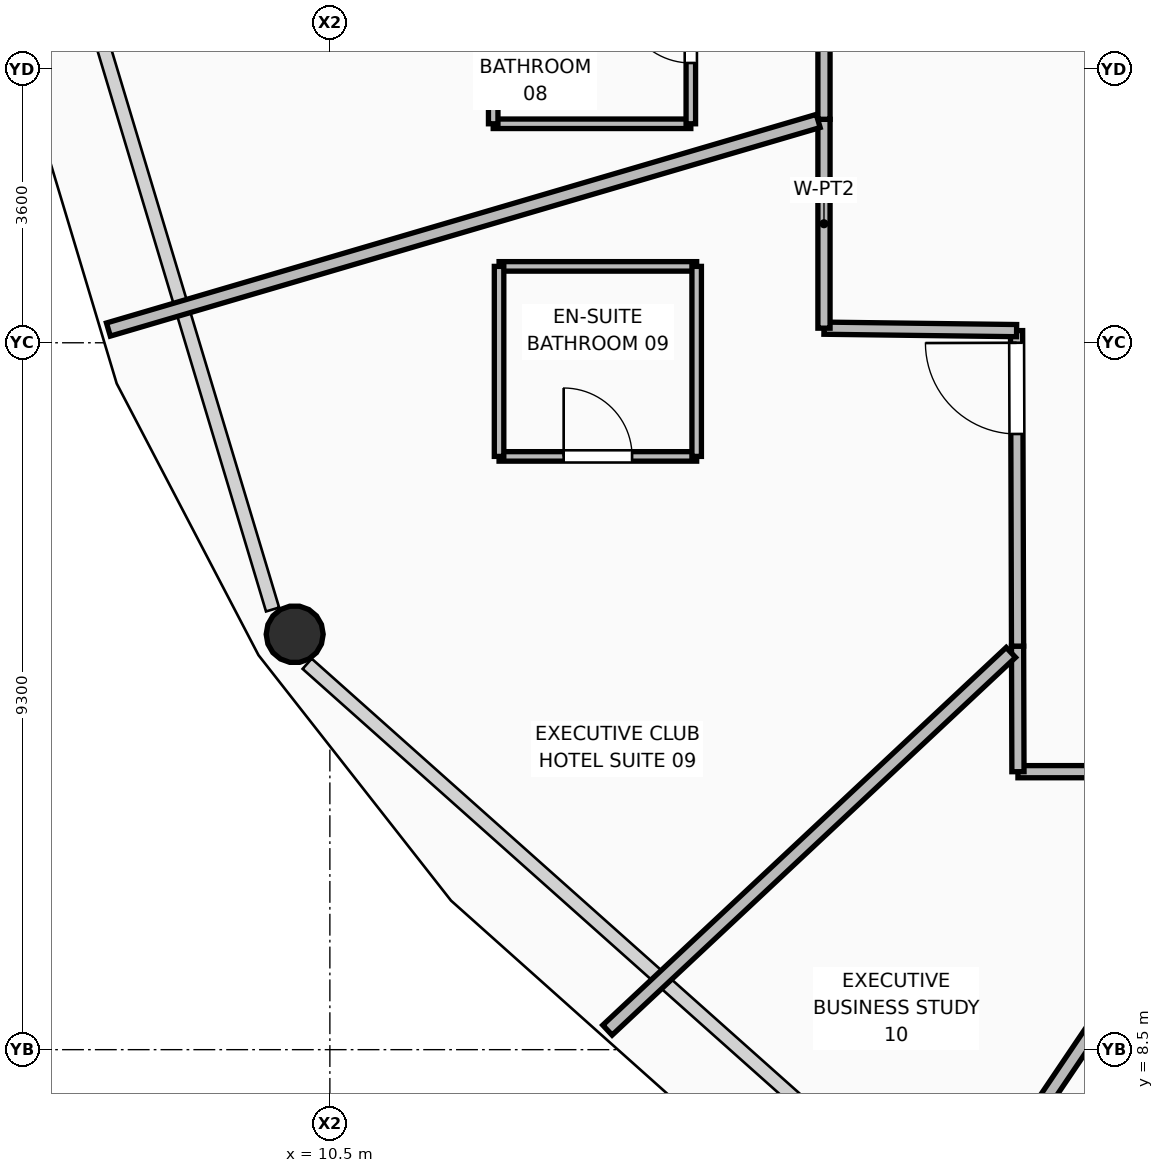
"""IFC4 building model, lengths in metres.
Left out: names, types, materials, properties, quantities, classifications, styles, units other than length and angle.
Written with IfcOpenShell. Run it as: python <this file> out.ifc"""

import sys

from ifc_helpers import new_model, si_unit, direction, frame, frame_2d, origin, origin_2d, place, context, subcontext, project, spatial, rectangle, hollow_circle, extrude, element, fill, save


model = new_model("IFC4")
c1 = context("Model", 3, precision=1e-05, world=origin(), true_north=direction((0.0, 1.0)))
c2 = subcontext(c1, "Body", "Model", "MODEL_VIEW")
j1 = project(units=[si_unit("LENGTHUNIT", "METRE"), si_unit("PLANEANGLEUNIT", "RADIAN")], contexts=[c1])
p1 = place(None, origin())
s1 = spatial("IfcSite", under=j1, at=p1, CompositionType="ELEMENT")
p2 = place(p1, origin())
s2 = spatial("IfcBuilding", under=s1, at=p2, CompositionType="ELEMENT")
p3 = place(p2, frame((0.0, 0.0, 157.2)))
s3 = spatial("IfcBuildingStorey", under=s2, at=p3, CompositionType="ELEMENT", Elevation=157.2)
p4 = place(p3, frame((10.037, 13.965, 0.0), z_axis=(0.0, 0.0, 1.0), x_axis=(1.0, 0.0, 0.0)))
e1 = element("IfcColumn", 1, at=p4, inside=s3, PredefinedType="COLUMN", context=c2, shape_type="SweptSolid", body=[
    extrude(hollow_circle(Radius=0.375, WallThickness=0.035, at=origin_2d()), origin(), (0.0, 0.0, 1.0), 3.57),
])
p5 = place(p3, frame((22.831, 12.158, 0.0), z_axis=(0.0, 0.0, 1.0), x_axis=(-0.999999955626, -0.000297907189, 0.0)))
e2 = element("IfcWall", 2, at=p5, inside=s3, PredefinedType="PARTITIONING", context=c2, shape_type="SweptSolid", body=[
    extrude(rectangle(XDim=3.278, YDim=0.16, at=frame_2d((1.639, 0.0))), origin(), (0.0, 0.0, 1.0), 3.006),
])
p6 = place(p5, frame((0.58, 0.0, 0.0)))
e3 = element("IfcOpeningElement", 3, at=p6, cuts=e2, PredefinedType="OPENING", context=c2, shape_type="SweptSolid", body=[
    extrude(rectangle(XDim=1.0, YDim=2.1, at=frame_2d((0.5, 1.05))), frame((0.0, 0.09, 0.0), z_axis=(0.0, -1.0, 0.0), x_axis=(1.0, 0.0, 0.0)), (0.0, 0.0, 1.0), 0.18),
])
p7 = place(p3, frame((19.553, 12.157, 0.0), z_axis=(0.0, 0.0, 1.0), x_axis=(-0.002955506524, 0.999995632481, 0.0)))
e4 = element("IfcWall", 4, at=p7, inside=s3, PredefinedType="PARTITIONING", context=c2, shape_type="SweptSolid", body=[
    extrude(rectangle(XDim=1.652, YDim=0.16, at=frame_2d((0.826, 0.0))), origin(), (0.0, 0.0, 1.0), 3.55),
])
p8 = place(p3, frame((19.548, 13.809, 0.0), z_axis=(0.0, 0.0, 1.0), x_axis=(-0.00317608091, 0.999994956242, 0.0)))
e5 = element("IfcWall", 5, at=p8, inside=s3, PredefinedType="PARTITIONING", context=c2, shape_type="SweptSolid", body=[
    extrude(rectangle(XDim=4.151, YDim=0.16, at=frame_2d((2.075, 0.0))), origin(), (0.0, 0.0, 1.0), 3.006),
])
p9 = place(p8, frame((2.791, 0.0, 0.0)))
e6 = element("IfcOpeningElement", 6, at=p9, cuts=e5, PredefinedType="OPENING", context=c2, shape_type="SweptSolid", body=[
    extrude(rectangle(XDim=1.2, YDim=2.1, at=frame_2d((0.6, 1.05))), frame((0.0, 0.09, 0.0), z_axis=(0.0, -1.0, 0.0), x_axis=(1.0, 0.0, 0.0)), (0.0, 0.0, 1.0), 0.18),
])
p10 = place(p3, frame((19.535, 17.96, 0.0), z_axis=(0.0, 0.0, 1.0), x_axis=(-0.999920356619, 0.01262063462, 0.0)))
e7 = element("IfcWall", 7, at=p10, inside=s3, PredefinedType="PARTITIONING", context=c2, shape_type="SweptSolid", body=[
    extrude(rectangle(XDim=2.534, YDim=0.16, at=frame_2d((1.267, 0.0))), origin(), (0.0, 0.0, 1.0), 3.55),
])
p11 = place(p3, frame((17.001, 17.992, 0.0), z_axis=(0.0, 0.0, 1.0), x_axis=(0.0, 1.0, 0.0)))
e8 = element("IfcWall", 8, at=p11, inside=s3, PredefinedType="PARTITIONING", context=c2, shape_type="SweptSolid", body=[
    extrude(rectangle(XDim=2.748, YDim=0.16, at=frame_2d((1.374, 0.0))), origin(), (0.0, 0.0, 1.0), 3.55),
])
p12 = place(p3, frame((17.001, 20.74, 0.0), z_axis=(0.0, 0.0, 1.0), x_axis=(0.0, 1.0, 0.0)))
e9 = element("IfcWall", 9, at=p12, inside=s3, PredefinedType="PARTITIONING", context=c2, shape_type="SweptSolid", body=[
    extrude(rectangle(XDim=3.118, YDim=0.16, at=frame_2d((1.559, 0.0))), origin(), (0.0, 0.0, 1.0), 3.006),
])
p13 = place(p3, frame((16.925, 20.718, 0.0), z_axis=(0.0, 0.0, 1.0), x_axis=(-0.959446138816, -0.2818920125, 0.0)))
e10 = element("IfcWall", 10, at=p13, inside=s3, PredefinedType="PARTITIONING", context=c2, shape_type="SweptSolid", body=[
    extrude(rectangle(XDim=9.734, YDim=0.18, at=frame_2d((4.867, 0.0))), origin(), (0.0, 0.0, 1.0), 2.852),
])
p14 = place(p3, frame((19.46, 13.726, 0.0), z_axis=(0.0, 0.0, 1.0), x_axis=(-0.730026032341, -0.683419338404, 0.0)))
e11 = element("IfcWall", 11, at=p14, inside=s3, PredefinedType="PARTITIONING", context=c2, shape_type="SweptSolid", body=[
    extrude(rectangle(XDim=7.271, YDim=0.18, at=frame_2d((3.635, 0.0))), origin(), (0.0, 0.0, 1.0), 2.852),
])
p15 = place(p3, frame((22.775, 12.075, 0.0), z_axis=(0.0, 0.0, 1.0), x_axis=(-0.559569383681, -0.828783509034, 0.0)))
e12 = element("IfcWall", 12, at=p15, inside=s3, PredefinedType="PARTITIONING", context=c2, shape_type="SweptSolid", body=[
    extrude(rectangle(XDim=7.645, YDim=0.18, at=frame_2d((3.822, 0.0))), origin(), (0.0, 0.0, 1.0), 2.852),
])
p16 = place(p3, frame((12.649, 20.681, 0.0), z_axis=(0.0, 0.0, 1.0), x_axis=(1.0, 0.0, 0.0)))
e13 = element("IfcWall", 13, at=p16, inside=s3, PredefinedType="PARTITIONING", context=c2, shape_type="SweptSolid", body=[
    extrude(rectangle(XDim=2.6, YDim=0.125, at=frame_2d((1.3, 0.0))), origin(), (0.0, 0.0, 1.0), 3.55),
])
p17 = place(p3, frame((12.649, 20.681, 0.0), z_axis=(0.0, 0.0, 1.0), x_axis=(0.0, 1.0, 0.0)))
e14 = element("IfcWall", 14, at=p17, inside=s3, PredefinedType="PARTITIONING", context=c2, shape_type="SweptSolid", body=[
    extrude(rectangle(XDim=2.5, YDim=0.125, at=frame_2d((1.25, 0.0))), origin(), (0.0, 0.0, 1.0), 3.006),
])
p18 = place(p3, frame((15.249, 20.681, 0.0), z_axis=(0.0, 0.0, 1.0), x_axis=(0.0, 1.0, 0.0)))
e15 = element("IfcWall", 15, at=p18, inside=s3, PredefinedType="PARTITIONING", context=c2, shape_type="SweptSolid", body=[
    extrude(rectangle(XDim=2.5, YDim=0.125, at=frame_2d((1.25, 0.0))), origin(), (0.0, 0.0, 1.0), 3.006),
])
p19 = place(p18, frame((0.8, 0.0, 0.0)))
e16 = element("IfcOpeningElement", 16, at=p19, cuts=e15, PredefinedType="OPENING", context=c2, shape_type="SweptSolid", body=[
    extrude(rectangle(XDim=0.9, YDim=2.1, at=frame_2d((0.45, 1.05))), frame((0.0, 0.073, 0.0), z_axis=(0.0, -1.0, 0.0), x_axis=(1.0, 0.0, 0.0)), (0.0, 0.0, 1.0), 0.145),
])
p20 = place(p3, frame((12.726, 16.305, 0.0), z_axis=(0.0, 0.0, 1.0), x_axis=(1.0, 0.0, 0.0)))
e17 = element("IfcWall", 17, at=p20, inside=s3, PredefinedType="PARTITIONING", context=c2, shape_type="SweptSolid", body=[
    extrude(rectangle(XDim=2.6, YDim=0.125, at=frame_2d((1.3, 0.0))), origin(), (0.0, 0.0, 1.0), 3.55),
])
p21 = place(p20, frame((0.85, 0.0, 0.0)))
e18 = element("IfcOpeningElement", 18, at=p21, cuts=e17, PredefinedType="OPENING", context=c2, shape_type="SweptSolid", body=[
    extrude(rectangle(XDim=0.9, YDim=2.1, at=frame_2d((0.45, 1.05))), frame((0.0, 0.073, 0.0), z_axis=(0.0, -1.0, 0.0), x_axis=(1.0, 0.0, 0.0)), (0.0, 0.0, 1.0), 0.145),
])
p22 = place(p3, frame((12.726, 18.805, 0.0), z_axis=(0.0, 0.0, 1.0), x_axis=(1.0, 0.0, 0.0)))
e19 = element("IfcWall", 19, at=p22, inside=s3, PredefinedType="PARTITIONING", context=c2, shape_type="SweptSolid", body=[
    extrude(rectangle(XDim=2.6, YDim=0.125, at=frame_2d((1.3, 0.0))), origin(), (0.0, 0.0, 1.0), 3.55),
])
for number, where, z_axis, x_axis in (
    (20, (12.726, 16.305, 0.0), (0.0, 0.0, 1.0), (0.0, 1.0, 0.0)),
    (21, (15.326, 16.305, 0.0), (0.0, 0.0, 1.0), (0.0, 1.0, 0.0)),
):
    element("IfcWall", number, at=place(p3, frame(where, z_axis=z_axis, x_axis=x_axis)), inside=s3, PredefinedType="PARTITIONING", context=c2, shape_type="SweptSolid", body=[
        extrude(rectangle(XDim=2.5, YDim=0.125, at=frame_2d((1.25, 0.0))), origin(), (0.0, 0.0, 1.0), 3.55),
    ])
p23 = place(p19, origin())
e22 = element("IfcDoor", 22, at=p23, inside=s3, OperationType="SINGLE_SWING_RIGHT", PredefinedType="DOOR", context=c2, shape_type="SweptSolid", body=[
    extrude(rectangle(XDim=0.9, YDim=2.1, at=frame_2d((0.45, 1.05))), frame((0.0, 0.025, 0.0), z_axis=(0.0, -1.0, 0.0), x_axis=(1.0, 0.0, 0.0)), (0.0, 0.0, 1.0), 0.05),
])
fill(e16, e22)
p24 = place(p21, origin())
e23 = element("IfcDoor", 23, at=p24, inside=s3, OperationType="SINGLE_SWING_LEFT", PredefinedType="DOOR", context=c2, shape_type="SweptSolid", body=[
    extrude(rectangle(XDim=0.9, YDim=2.1, at=frame_2d((0.45, 1.05))), frame((0.0, 0.025, 0.0), z_axis=(0.0, -1.0, 0.0), x_axis=(1.0, 0.0, 0.0)), (0.0, 0.0, 1.0), 0.05),
])
fill(e18, e23)
p25 = place(p9, origin())
e24 = element("IfcDoor", 24, at=p25, inside=s3, OperationType="SINGLE_SWING_RIGHT", PredefinedType="DOOR", context=c2, shape_type="SweptSolid", body=[
    extrude(rectangle(XDim=1.2, YDim=2.1, at=frame_2d((0.6, 1.05))), frame((0.0, 0.025, 0.0), z_axis=(0.0, -1.0, 0.0), x_axis=(1.0, 0.0, 0.0)), (0.0, 0.0, 1.0), 0.05),
])
fill(e6, e24)
save(model, sys.argv[1])
